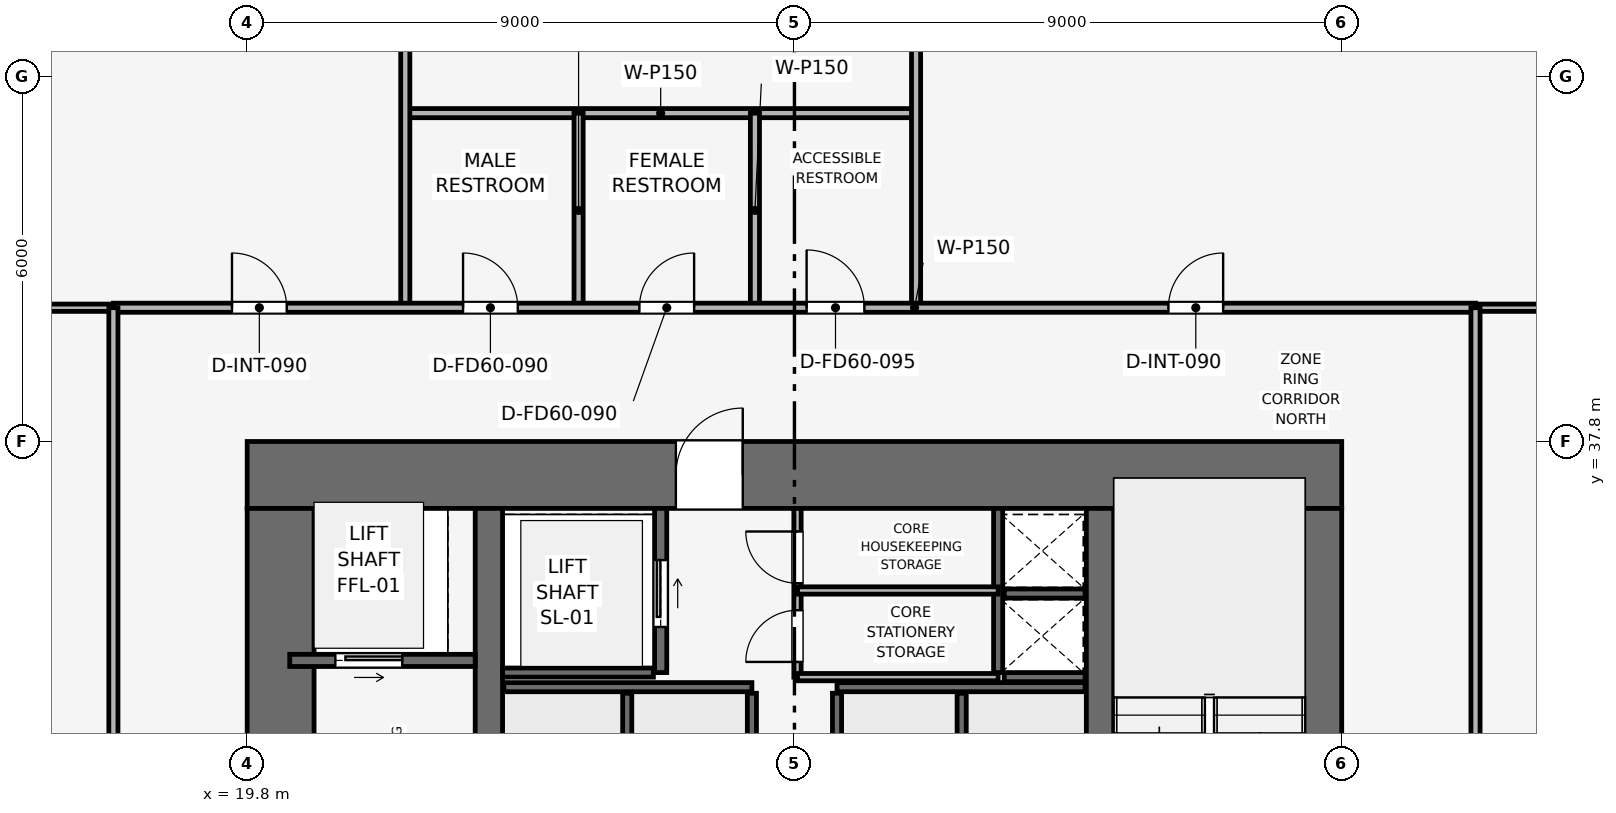
"""IFC4 building model, lengths in metres.
Left out: names, types, materials, properties, quantities, classifications, styles, units other than length and angle.
Written with IfcOpenShell. Run it as: python <this file> out.ifc"""

import sys

from ifc_helpers import new_model, si_unit, direction, frame, frame_2d, origin, place, context, subcontext, project, spatial, rectangle, extrude, element, fill, save


model = new_model("IFC4")
c1 = context("Model", 3, precision=1e-05, world=origin(), true_north=direction((0.0, 1.0)))
c2 = subcontext(c1, "Body", "Model", "MODEL_VIEW")
j1 = project(units=[si_unit("LENGTHUNIT", "METRE"), si_unit("PLANEANGLEUNIT", "RADIAN")], contexts=[c1])
p1 = place(None, origin())
s1 = spatial("IfcSite", under=j1, at=p1, CompositionType="ELEMENT")
p2 = place(p1, origin())
s2 = spatial("IfcBuilding", under=s1, at=p2, CompositionType="ELEMENT")
p3 = place(p2, frame((0.0, 0.0, 69.0)))
s3 = spatial("IfcBuildingStorey", under=s2, at=p3, CompositionType="ELEMENT", Elevation=69.0)
p4 = place(p3, frame((19.8, 37.25, 0.0), z_axis=(0.0, 0.0, 1.0), x_axis=(1.0, 0.0, 0.0)))
e1 = element("IfcWall", 1, at=p4, inside=s3, PredefinedType="SHEAR", context=c2, shape_type="SweptSolid", body=[
    extrude(rectangle(XDim=18.0, YDim=1.1, at=frame_2d((9.0, 0.0))), origin(), (0.0, 0.0, 1.0), 3.9),
])
p5 = place(p4, frame((7.05, 0.0, 0.0)))
e2 = element("IfcOpeningElement", 2, at=p5, cuts=e1, PredefinedType="OPENING", context=c2, shape_type="SweptSolid", body=[
    extrude(rectangle(XDim=1.1, YDim=2.15, at=frame_2d((0.55, 1.075))), frame((0.0, 0.56, 0.0), z_axis=(0.0, -1.0, 0.0), x_axis=(1.0, 0.0, 0.0)), (0.0, 0.0, 1.0), 1.12),
])
p6 = place(p3, frame((20.35, 20.9, 0.0), z_axis=(0.0, 0.0, 1.0), x_axis=(0.0, 1.0, 0.0)))
e3 = element("IfcWall", 3, at=p6, inside=s3, PredefinedType="SHEAR", context=c2, shape_type="SweptSolid", body=[
    extrude(rectangle(XDim=15.8, YDim=1.1, at=frame_2d((7.9, 0.0))), origin(), (0.0, 0.0, 1.0), 3.9),
])
p7 = place(p6, frame((9.9, 0.0, 0.0)))
e4 = element("IfcOpeningElement", 4, at=p7, cuts=e3, PredefinedType="OPENING", context=c2, shape_type="SweptSolid", body=[
    extrude(rectangle(XDim=1.1, YDim=2.15, at=frame_2d((0.55, 1.075))), frame((0.0, 0.56, 0.0), z_axis=(0.0, -1.0, 0.0), x_axis=(1.0, 0.0, 0.0)), (0.0, 0.0, 1.0), 1.12),
])
p8 = place(p3, frame((37.25, 20.9, 0.0), z_axis=(0.0, 0.0, 1.0), x_axis=(0.0, 1.0, 0.0)))
e5 = element("IfcWall", 5, at=p8, inside=s3, PredefinedType="SHEAR", context=c2, shape_type="SweptSolid", body=[
    extrude(rectangle(XDim=15.8, YDim=1.1, at=frame_2d((7.9, 0.0))), origin(), (0.0, 0.0, 1.0), 3.9),
])
p9 = place(p8, frame((4.4, 0.0, 0.0)))
e6 = element("IfcOpeningElement", 6, at=p9, cuts=e5, PredefinedType="OPENING", context=c2, shape_type="SweptSolid", body=[
    extrude(rectangle(XDim=1.1, YDim=2.15, at=frame_2d((0.55, 1.075))), frame((0.0, 0.56, 0.0), z_axis=(0.0, -1.0, 0.0), x_axis=(1.0, 0.0, 0.0)), (0.0, 0.0, 1.0), 1.12),
])
for number, where, z_axis, x_axis in (
    (7, (23.775, 20.9, 0.0), (0.0, 0.0, 1.0), (0.0, 1.0, 0.0)),
    (8, (33.825, 20.9, 0.0), (0.0, 0.0, 1.0), (0.0, 1.0, 0.0)),
):
    element("IfcWall", number, at=place(p3, frame(where, z_axis=z_axis, x_axis=x_axis)), inside=s3, PredefinedType="SHEAR", context=c2, shape_type="SweptSolid", body=[
        extrude(rectangle(XDim=15.8, YDim=0.45, at=frame_2d((7.9, 0.0))), origin(), (0.0, 0.0, 1.0), 3.9),
    ])
p10 = place(p3, frame((32.15, 34.0, 0.0), z_axis=(0.0, 0.0, 1.0), x_axis=(0.0, 1.0, 0.0)))
e9 = element("IfcWall", 9, at=p10, inside=s3, PredefinedType="SHEAR", context=c2, shape_type="SweptSolid", body=[
    extrude(rectangle(XDim=2.7, YDim=0.15, at=frame_2d((1.35, 0.0))), origin(), (0.0, 0.0, 1.0), 3.65),
])
for number, where, z_axis, x_axis in (
    (10, (32.25, 33.925, 0.0), (0.0, 0.0, 1.0), (1.0, 0.0, 0.0)),
    (11, (32.25, 35.3, 0.0), (0.0, 0.0, 1.0), (1.0, 0.0, 0.0)),
):
    element("IfcWall", number, at=place(p3, frame(where, z_axis=z_axis, x_axis=x_axis)), inside=s3, PredefinedType="SHEAR", context=c2, shape_type="SweptSolid", body=[
        extrude(rectangle(XDim=1.33, YDim=0.15, at=frame_2d((0.665, 0.0))), origin(), (0.0, 0.0, 1.0), 3.65),
    ])
p11 = place(p3, frame((20.5, 34.2, 0.0), z_axis=(0.0, 0.0, 1.0), x_axis=(1.0, 0.0, 0.0)))
e12 = element("IfcWall", 12, at=p11, inside=s3, PredefinedType="SHEAR", context=c2, shape_type="SweptSolid", body=[
    extrude(rectangle(XDim=3.05, YDim=0.2, at=frame_2d((1.525, 0.0))), origin(), (0.0, 0.0, 1.0), 3.65),
])
p12 = place(p11, frame((0.75, 0.0, 0.0)))
e13 = element("IfcOpeningElement", 13, at=p12, cuts=e12, PredefinedType="OPENING", context=c2, shape_type="SweptSolid", body=[
    extrude(rectangle(XDim=1.1, YDim=2.15, at=frame_2d((0.55, 1.075))), frame((0.0, 0.11, 0.0), z_axis=(0.0, -1.0, 0.0), x_axis=(1.0, 0.0, 0.0)), (0.0, 0.0, 1.0), 0.22),
])
p13 = place(p3, frame((26.6, 34.0, 0.0), z_axis=(0.0, 0.0, 1.0), x_axis=(0.0, 1.0, 0.0)))
e14 = element("IfcWall", 14, at=p13, inside=s3, PredefinedType="SHEAR", context=c2, shape_type="SweptSolid", body=[
    extrude(rectangle(XDim=2.7, YDim=0.2, at=frame_2d((1.35, 0.0))), origin(), (0.0, 0.0, 1.0), 3.65),
])
p14 = place(p13, frame((0.75, 0.0, 0.0)))
e15 = element("IfcOpeningElement", 15, at=p14, cuts=e14, PredefinedType="OPENING", context=c2, shape_type="SweptSolid", body=[
    extrude(rectangle(XDim=1.1, YDim=2.15, at=frame_2d((0.55, 1.075))), frame((0.0, 0.11, 0.0), z_axis=(0.0, -1.0, 0.0), x_axis=(1.0, 0.0, 0.0)), (0.0, 0.0, 1.0), 0.22),
])
p15 = place(p3, frame((24.0, 34.0, 0.0), z_axis=(0.0, 0.0, 1.0), x_axis=(1.0, 0.0, 0.0)))
e16 = element("IfcWall", 16, at=p15, inside=s3, PredefinedType="SHEAR", context=c2, shape_type="SweptSolid", body=[
    extrude(rectangle(XDim=2.48, YDim=0.15, at=frame_2d((1.24, 0.0))), origin(), (0.0, 0.0, 1.0), 3.65),
])
for number, where, z_axis, x_axis in (
    (17, (24.02, 33.76, 0.0), (0.0, 0.0, 1.0), (1.0, 0.0, 0.0)),
    (18, (29.5, 33.76, 0.0), (0.0, 0.0, 1.0), (1.0, 0.0, 0.0)),
):
    element("IfcWall", number, at=place(p3, frame(where, z_axis=z_axis, x_axis=x_axis)), inside=s3, PredefinedType="SHEAR", context=c2, shape_type="SweptSolid", body=[
        extrude(rectangle(XDim=4.08, YDim=0.15, at=frame_2d((2.04, 0.0))), origin(), (0.0, 0.0, 1.0), 3.65),
    ])
for number, where, z_axis, x_axis in (
    (19, (26.05, 31.42, 0.0), (0.0, 0.0, 1.0), (0.0, 1.0, 0.0)),
    (20, (28.1, 31.42, 0.0), (0.0, 0.0, 1.0), (0.0, 1.0, 0.0)),
    (21, (29.5, 31.42, 0.0), (0.0, 0.0, 1.0), (0.0, 1.0, 0.0)),
    (22, (31.55, 31.42, 0.0), (0.0, 0.0, 1.0), (0.0, 1.0, 0.0)),
):
    element("IfcWall", number, at=place(p3, frame(where, z_axis=z_axis, x_axis=x_axis)), inside=s3, PredefinedType="SHEAR", context=c2, shape_type="SweptSolid", body=[
        extrude(rectangle(XDim=2.24, YDim=0.15, at=frame_2d((1.12, 0.0))), origin(), (0.0, 0.0, 1.0), 3.65),
    ])
p16 = place(p3, frame((28.85, 33.925, 0.0), z_axis=(0.0, 0.0, 1.0), x_axis=(0.0, 1.0, 0.0)))
e23 = element("IfcWall", 23, at=p16, inside=s3, PredefinedType="PARTITIONING", context=c2, shape_type="SweptSolid", body=[
    extrude(rectangle(XDim=2.775, YDim=0.12, at=frame_2d((1.387, 0.0))), origin(), (0.0, 0.0, 1.0), 3.65),
])
p17 = place(p16, frame((0.25, 0.0, 0.0)))
e24 = element("IfcOpeningElement", 24, at=p17, cuts=e23, PredefinedType="OPENING", context=c2, shape_type="SweptSolid", body=[
    extrude(rectangle(XDim=0.85, YDim=2.1, at=frame_2d((0.425, 1.05))), frame((0.0, 0.07, 0.0), z_axis=(0.0, -1.0, 0.0), x_axis=(1.0, 0.0, 0.0)), (0.0, 0.0, 1.0), 0.14),
])
p18 = place(p16, frame((1.545, 0.0, 0.0)))
e25 = element("IfcOpeningElement", 25, at=p18, cuts=e23, PredefinedType="OPENING", context=c2, shape_type="SweptSolid", body=[
    extrude(rectangle(XDim=0.85, YDim=2.1, at=frame_2d((0.425, 1.05))), frame((0.0, 0.07, 0.0), z_axis=(0.0, -1.0, 0.0), x_axis=(1.0, 0.0, 0.0)), (0.0, 0.0, 1.0), 0.14),
])
for number, where, z_axis, x_axis in (
    (26, (28.85, 35.35, 0.0), (0.0, 0.0, 1.0), (1.0, 0.0, 0.0)),
    (27, (28.85, 33.925, 0.0), (0.0, 0.0, 1.0), (1.0, 0.0, 0.0)),
):
    element("IfcWall", number, at=place(p3, frame(where, z_axis=z_axis, x_axis=x_axis)), inside=s3, PredefinedType="PARTITIONING", context=c2, shape_type="SweptSolid", body=[
        extrude(rectangle(XDim=3.3, YDim=0.12, at=frame_2d((1.65, 0.0))), origin(), (0.0, 0.0, 1.0), 3.65),
    ])
p19 = place(p3, frame((22.4, 43.2, 0.0), z_axis=(0.0, 0.0, 1.0), x_axis=(1.0, 0.0, 0.0)))
e28 = element("IfcWall", 28, at=p19, inside=s3, PredefinedType="PARTITIONING", context=c2, shape_type="SweptSolid", body=[
    extrude(rectangle(XDim=8.4, YDim=0.15, at=frame_2d((4.2, 0.0))), origin(), (0.0, 0.0, 1.0), 3.085),
])
p20 = place(p3, frame((22.4, 40.0, 0.0), z_axis=(0.0, 0.0, 1.0), x_axis=(0.0, 1.0, 0.0)))
e29 = element("IfcWall", 29, at=p20, inside=s3, PredefinedType="PARTITIONING", context=c2, shape_type="SweptSolid", body=[
    extrude(rectangle(XDim=16.57, YDim=0.15, at=frame_2d((8.285, 0.0))), origin(), (0.0, 0.0, 1.0), 2.935),
])
p21 = place(p20, frame((9.435, 0.0, 0.0)))
e30 = element("IfcOpeningElement", 30, at=p21, cuts=e29, PredefinedType="OPENING", context=c2, shape_type="SweptSolid", body=[
    extrude(rectangle(XDim=0.9, YDim=2.1, at=frame_2d((0.45, 1.05))), frame((0.0, 0.085, 0.0), z_axis=(0.0, -1.0, 0.0), x_axis=(1.0, 0.0, 0.0)), (0.0, 0.0, 1.0), 0.17),
])
p22 = place(p3, frame((30.8, 40.0, 0.0), z_axis=(0.0, 0.0, 1.0), x_axis=(0.0, 1.0, 0.0)))
e31 = element("IfcWall", 31, at=p22, inside=s3, PredefinedType="PARTITIONING", context=c2, shape_type="SweptSolid", body=[
    extrude(rectangle(XDim=16.57, YDim=0.15, at=frame_2d((8.285, 0.0))), origin(), (0.0, 0.0, 1.0), 2.935),
])
for number, where, z_axis, x_axis in (
    (32, (25.25, 40.0, 0.0), (0.0, 0.0, 1.0), (0.0, 1.0, 0.0)),
    (33, (28.15, 40.0, 0.0), (0.0, 0.0, 1.0), (0.0, 1.0, 0.0)),
):
    element("IfcWall", number, at=place(p3, frame(where, z_axis=z_axis, x_axis=x_axis)), inside=s3, PredefinedType="PARTITIONING", context=c2, shape_type="SweptSolid", body=[
        extrude(rectangle(XDim=3.2, YDim=0.15, at=frame_2d((1.6, 0.0))), origin(), (0.0, 0.0, 1.0), 3.65),
    ])
for number, where, z_axis, x_axis in (
    (34, (1.03, 40.0, 0.0), (0.0, 0.0, 1.0), (1.0, 0.0, 0.0)),
    (35, (40.0, 40.0, 0.0), (0.0, 0.0, 1.0), (1.0, 0.0, 0.0)),
):
    element("IfcWall", number, at=place(p3, frame(where, z_axis=z_axis, x_axis=x_axis)), inside=s3, PredefinedType="PARTITIONING", context=c2, shape_type="SweptSolid", body=[
        extrude(rectangle(XDim=16.57, YDim=0.12, at=frame_2d((8.285, 0.0))), origin(), (0.0, 0.0, 1.0), 2.935),
    ])
p23 = place(p3, frame((17.6, 40.0, 0.0), z_axis=(0.0, 0.0, 1.0), x_axis=(1.0, 0.0, 0.0)))
e36 = element("IfcWall", 36, at=p23, inside=s3, PredefinedType="PARTITIONING", context=c2, shape_type="SweptSolid", body=[
    extrude(rectangle(XDim=22.4, YDim=0.15, at=frame_2d((11.2, 0.0))), origin(), (0.0, 0.0, 1.0), 3.085),
])
p24 = place(p23, frame((1.95, 0.0, 0.0)))
e37 = element("IfcOpeningElement", 37, at=p24, cuts=e36, PredefinedType="OPENING", context=c2, shape_type="SweptSolid", body=[
    extrude(rectangle(XDim=0.9, YDim=2.1, at=frame_2d((0.45, 1.05))), frame((0.0, 0.085, 0.0), z_axis=(0.0, -1.0, 0.0), x_axis=(1.0, 0.0, 0.0)), (0.0, 0.0, 1.0), 0.17),
])
p25 = place(p23, frame((5.75, 0.0, 0.0)))
e38 = element("IfcOpeningElement", 38, at=p25, cuts=e36, PredefinedType="OPENING", context=c2, shape_type="SweptSolid", body=[
    extrude(rectangle(XDim=0.9, YDim=2.1, at=frame_2d((0.45, 1.05))), frame((0.0, 0.085, 0.0), z_axis=(0.0, -1.0, 0.0), x_axis=(1.0, 0.0, 0.0)), (0.0, 0.0, 1.0), 0.17),
])
p26 = place(p23, frame((8.65, 0.0, 0.0)))
e39 = element("IfcOpeningElement", 39, at=p26, cuts=e36, PredefinedType="OPENING", context=c2, shape_type="SweptSolid", body=[
    extrude(rectangle(XDim=0.9, YDim=2.1, at=frame_2d((0.45, 1.05))), frame((0.0, 0.085, 0.0), z_axis=(0.0, -1.0, 0.0), x_axis=(1.0, 0.0, 0.0)), (0.0, 0.0, 1.0), 0.17),
])
p27 = place(p23, frame((11.4, 0.0, 0.0)))
e40 = element("IfcOpeningElement", 40, at=p27, cuts=e36, PredefinedType="OPENING", context=c2, shape_type="SweptSolid", body=[
    extrude(rectangle(XDim=0.95, YDim=2.1, at=frame_2d((0.475, 1.05))), frame((0.0, 0.085, 0.0), z_axis=(0.0, -1.0, 0.0), x_axis=(1.0, 0.0, 0.0)), (0.0, 0.0, 1.0), 0.17),
])
p28 = place(p23, frame((17.35, 0.0, 0.0)))
e41 = element("IfcOpeningElement", 41, at=p28, cuts=e36, PredefinedType="OPENING", context=c2, shape_type="SweptSolid", body=[
    extrude(rectangle(XDim=0.9, YDim=2.1, at=frame_2d((0.45, 1.05))), frame((0.0, 0.085, 0.0), z_axis=(0.0, -1.0, 0.0), x_axis=(1.0, 0.0, 0.0)), (0.0, 0.0, 1.0), 0.17),
])
p29 = place(p3, frame((17.6, 17.6, 0.0), z_axis=(0.0, 0.0, 1.0), x_axis=(0.0, 1.0, 0.0)))
e42 = element("IfcWall", 42, at=p29, inside=s3, PredefinedType="PARTITIONING", context=c2, shape_type="SweptSolid", body=[
    extrude(rectangle(XDim=22.4, YDim=0.15, at=frame_2d((11.2, 0.0))), origin(), (0.0, 0.0, 1.0), 3.085),
])
p30 = place(p29, frame((10.75, 0.0, 0.0)))
e43 = element("IfcOpeningElement", 43, at=p30, cuts=e42, PredefinedType="OPENING", context=c2, shape_type="SweptSolid", body=[
    extrude(rectangle(XDim=0.9, YDim=2.1, at=frame_2d((0.45, 1.05))), frame((0.0, 0.085, 0.0), z_axis=(0.0, -1.0, 0.0), x_axis=(1.0, 0.0, 0.0)), (0.0, 0.0, 1.0), 0.17),
])
p31 = place(p3, frame((40.0, 17.6, 0.0), z_axis=(0.0, 0.0, 1.0), x_axis=(0.0, 1.0, 0.0)))
e44 = element("IfcWall", 44, at=p31, inside=s3, PredefinedType="PARTITIONING", context=c2, shape_type="SweptSolid", body=[
    extrude(rectangle(XDim=22.4, YDim=0.15, at=frame_2d((11.2, 0.0))), origin(), (0.0, 0.0, 1.0), 3.085),
])
p32 = place(p31, frame((2.569, 0.0, 0.0)))
e45 = element("IfcOpeningElement", 45, at=p32, cuts=e44, PredefinedType="OPENING", context=c2, shape_type="SweptSolid", body=[
    extrude(rectangle(XDim=0.9, YDim=2.1, at=frame_2d((0.45, 1.05))), frame((0.0, 0.085, 0.0), z_axis=(0.0, -1.0, 0.0), x_axis=(1.0, 0.0, 0.0)), (0.0, 0.0, 1.0), 0.17),
])
p33 = place(p31, frame((13.769, 0.0, 0.0)))
e46 = element("IfcOpeningElement", 46, at=p33, cuts=e44, PredefinedType="OPENING", context=c2, shape_type="SweptSolid", body=[
    extrude(rectangle(XDim=0.9, YDim=2.1, at=frame_2d((0.45, 1.05))), frame((0.0, 0.085, 0.0), z_axis=(0.0, -1.0, 0.0), x_axis=(1.0, 0.0, 0.0)), (0.0, 0.0, 1.0), 0.17),
])
p34 = place(p12, origin())
e47 = element("IfcDoor", 47, at=p34, inside=s3, OperationType="SLIDING_TO_RIGHT", PredefinedType="DOOR", context=c2, shape_type="SweptSolid", body=[
    extrude(rectangle(XDim=1.1, YDim=2.15, at=frame_2d((0.55, 1.075))), frame((0.0, 0.025, 0.0), z_axis=(0.0, -1.0, 0.0), x_axis=(1.0, 0.0, 0.0)), (0.0, 0.0, 1.0), 0.05),
])
fill(e13, e47)
p35 = place(p14, origin())
e48 = element("IfcDoor", 48, at=p35, inside=s3, OperationType="SLIDING_TO_RIGHT", PredefinedType="DOOR", context=c2, shape_type="SweptSolid", body=[
    extrude(rectangle(XDim=1.1, YDim=2.15, at=frame_2d((0.55, 1.075))), frame((0.0, 0.025, 0.0), z_axis=(0.0, -1.0, 0.0), x_axis=(1.0, 0.0, 0.0)), (0.0, 0.0, 1.0), 0.05),
])
fill(e15, e48)
p36 = place(p17, origin())
e49 = element("IfcDoor", 49, at=p36, inside=s3, OperationType="SINGLE_SWING_LEFT", PredefinedType="DOOR", context=c2, shape_type="SweptSolid", body=[
    extrude(rectangle(XDim=0.85, YDim=2.1, at=frame_2d((0.425, 1.05))), frame((0.0, 0.025, 0.0), z_axis=(0.0, -1.0, 0.0), x_axis=(1.0, 0.0, 0.0)), (0.0, 0.0, 1.0), 0.05),
])
fill(e24, e49)
p37 = place(p18, origin())
e50 = element("IfcDoor", 50, at=p37, inside=s3, OperationType="SINGLE_SWING_RIGHT", PredefinedType="DOOR", context=c2, shape_type="SweptSolid", body=[
    extrude(rectangle(XDim=0.85, YDim=2.1, at=frame_2d((0.425, 1.05))), frame((0.0, 0.025, 0.0), z_axis=(0.0, -1.0, 0.0), x_axis=(1.0, 0.0, 0.0)), (0.0, 0.0, 1.0), 0.05),
])
fill(e25, e50)
p38 = place(p24, origin())
e51 = element("IfcDoor", 51, at=p38, inside=s3, OperationType="SINGLE_SWING_LEFT", PredefinedType="DOOR", context=c2, shape_type="SweptSolid", body=[
    extrude(rectangle(XDim=0.9, YDim=2.1, at=frame_2d((0.45, 1.05))), frame((0.0, 0.025, 0.0), z_axis=(0.0, -1.0, 0.0), x_axis=(1.0, 0.0, 0.0)), (0.0, 0.0, 1.0), 0.05),
])
fill(e37, e51)
p39 = place(p25, origin())
e52 = element("IfcDoor", 52, at=p39, inside=s3, OperationType="SINGLE_SWING_LEFT", PredefinedType="DOOR", context=c2, shape_type="SweptSolid", body=[
    extrude(rectangle(XDim=0.9, YDim=2.1, at=frame_2d((0.45, 1.05))), frame((0.0, 0.025, 0.0), z_axis=(0.0, -1.0, 0.0), x_axis=(1.0, 0.0, 0.0)), (0.0, 0.0, 1.0), 0.05),
])
fill(e38, e52)
p40 = place(p26, origin())
e53 = element("IfcDoor", 53, at=p40, inside=s3, OperationType="SINGLE_SWING_RIGHT", PredefinedType="DOOR", context=c2, shape_type="SweptSolid", body=[
    extrude(rectangle(XDim=0.9, YDim=2.1, at=frame_2d((0.45, 1.05))), frame((0.0, 0.025, 0.0), z_axis=(0.0, -1.0, 0.0), x_axis=(1.0, 0.0, 0.0)), (0.0, 0.0, 1.0), 0.05),
])
fill(e39, e53)
p41 = place(p27, origin())
e54 = element("IfcDoor", 54, at=p41, inside=s3, OperationType="SINGLE_SWING_LEFT", PredefinedType="DOOR", context=c2, shape_type="SweptSolid", body=[
    extrude(rectangle(XDim=0.95, YDim=2.1, at=frame_2d((0.475, 1.05))), frame((0.0, 0.025, 0.0), z_axis=(0.0, -1.0, 0.0), x_axis=(1.0, 0.0, 0.0)), (0.0, 0.0, 1.0), 0.05),
])
fill(e40, e54)
p42 = place(p28, origin())
e55 = element("IfcDoor", 55, at=p42, inside=s3, OperationType="SINGLE_SWING_RIGHT", PredefinedType="DOOR", context=c2, shape_type="SweptSolid", body=[
    extrude(rectangle(XDim=0.9, YDim=2.1, at=frame_2d((0.45, 1.05))), frame((0.0, 0.025, 0.0), z_axis=(0.0, -1.0, 0.0), x_axis=(1.0, 0.0, 0.0)), (0.0, 0.0, 1.0), 0.05),
])
fill(e41, e55)
p43 = place(p5, origin())
e56 = element("IfcDoor", 56, at=p43, inside=s3, OperationType="SINGLE_SWING_RIGHT", PredefinedType="DOOR", context=c2, shape_type="SweptSolid", body=[
    extrude(rectangle(XDim=1.1, YDim=2.15, at=frame_2d((0.55, 1.075))), frame((0.0, 0.025, 0.0), z_axis=(0.0, -1.0, 0.0), x_axis=(1.0, 0.0, 0.0)), (0.0, 0.0, 1.0), 0.05),
])
fill(e2, e56)
save(model, sys.argv[1])
